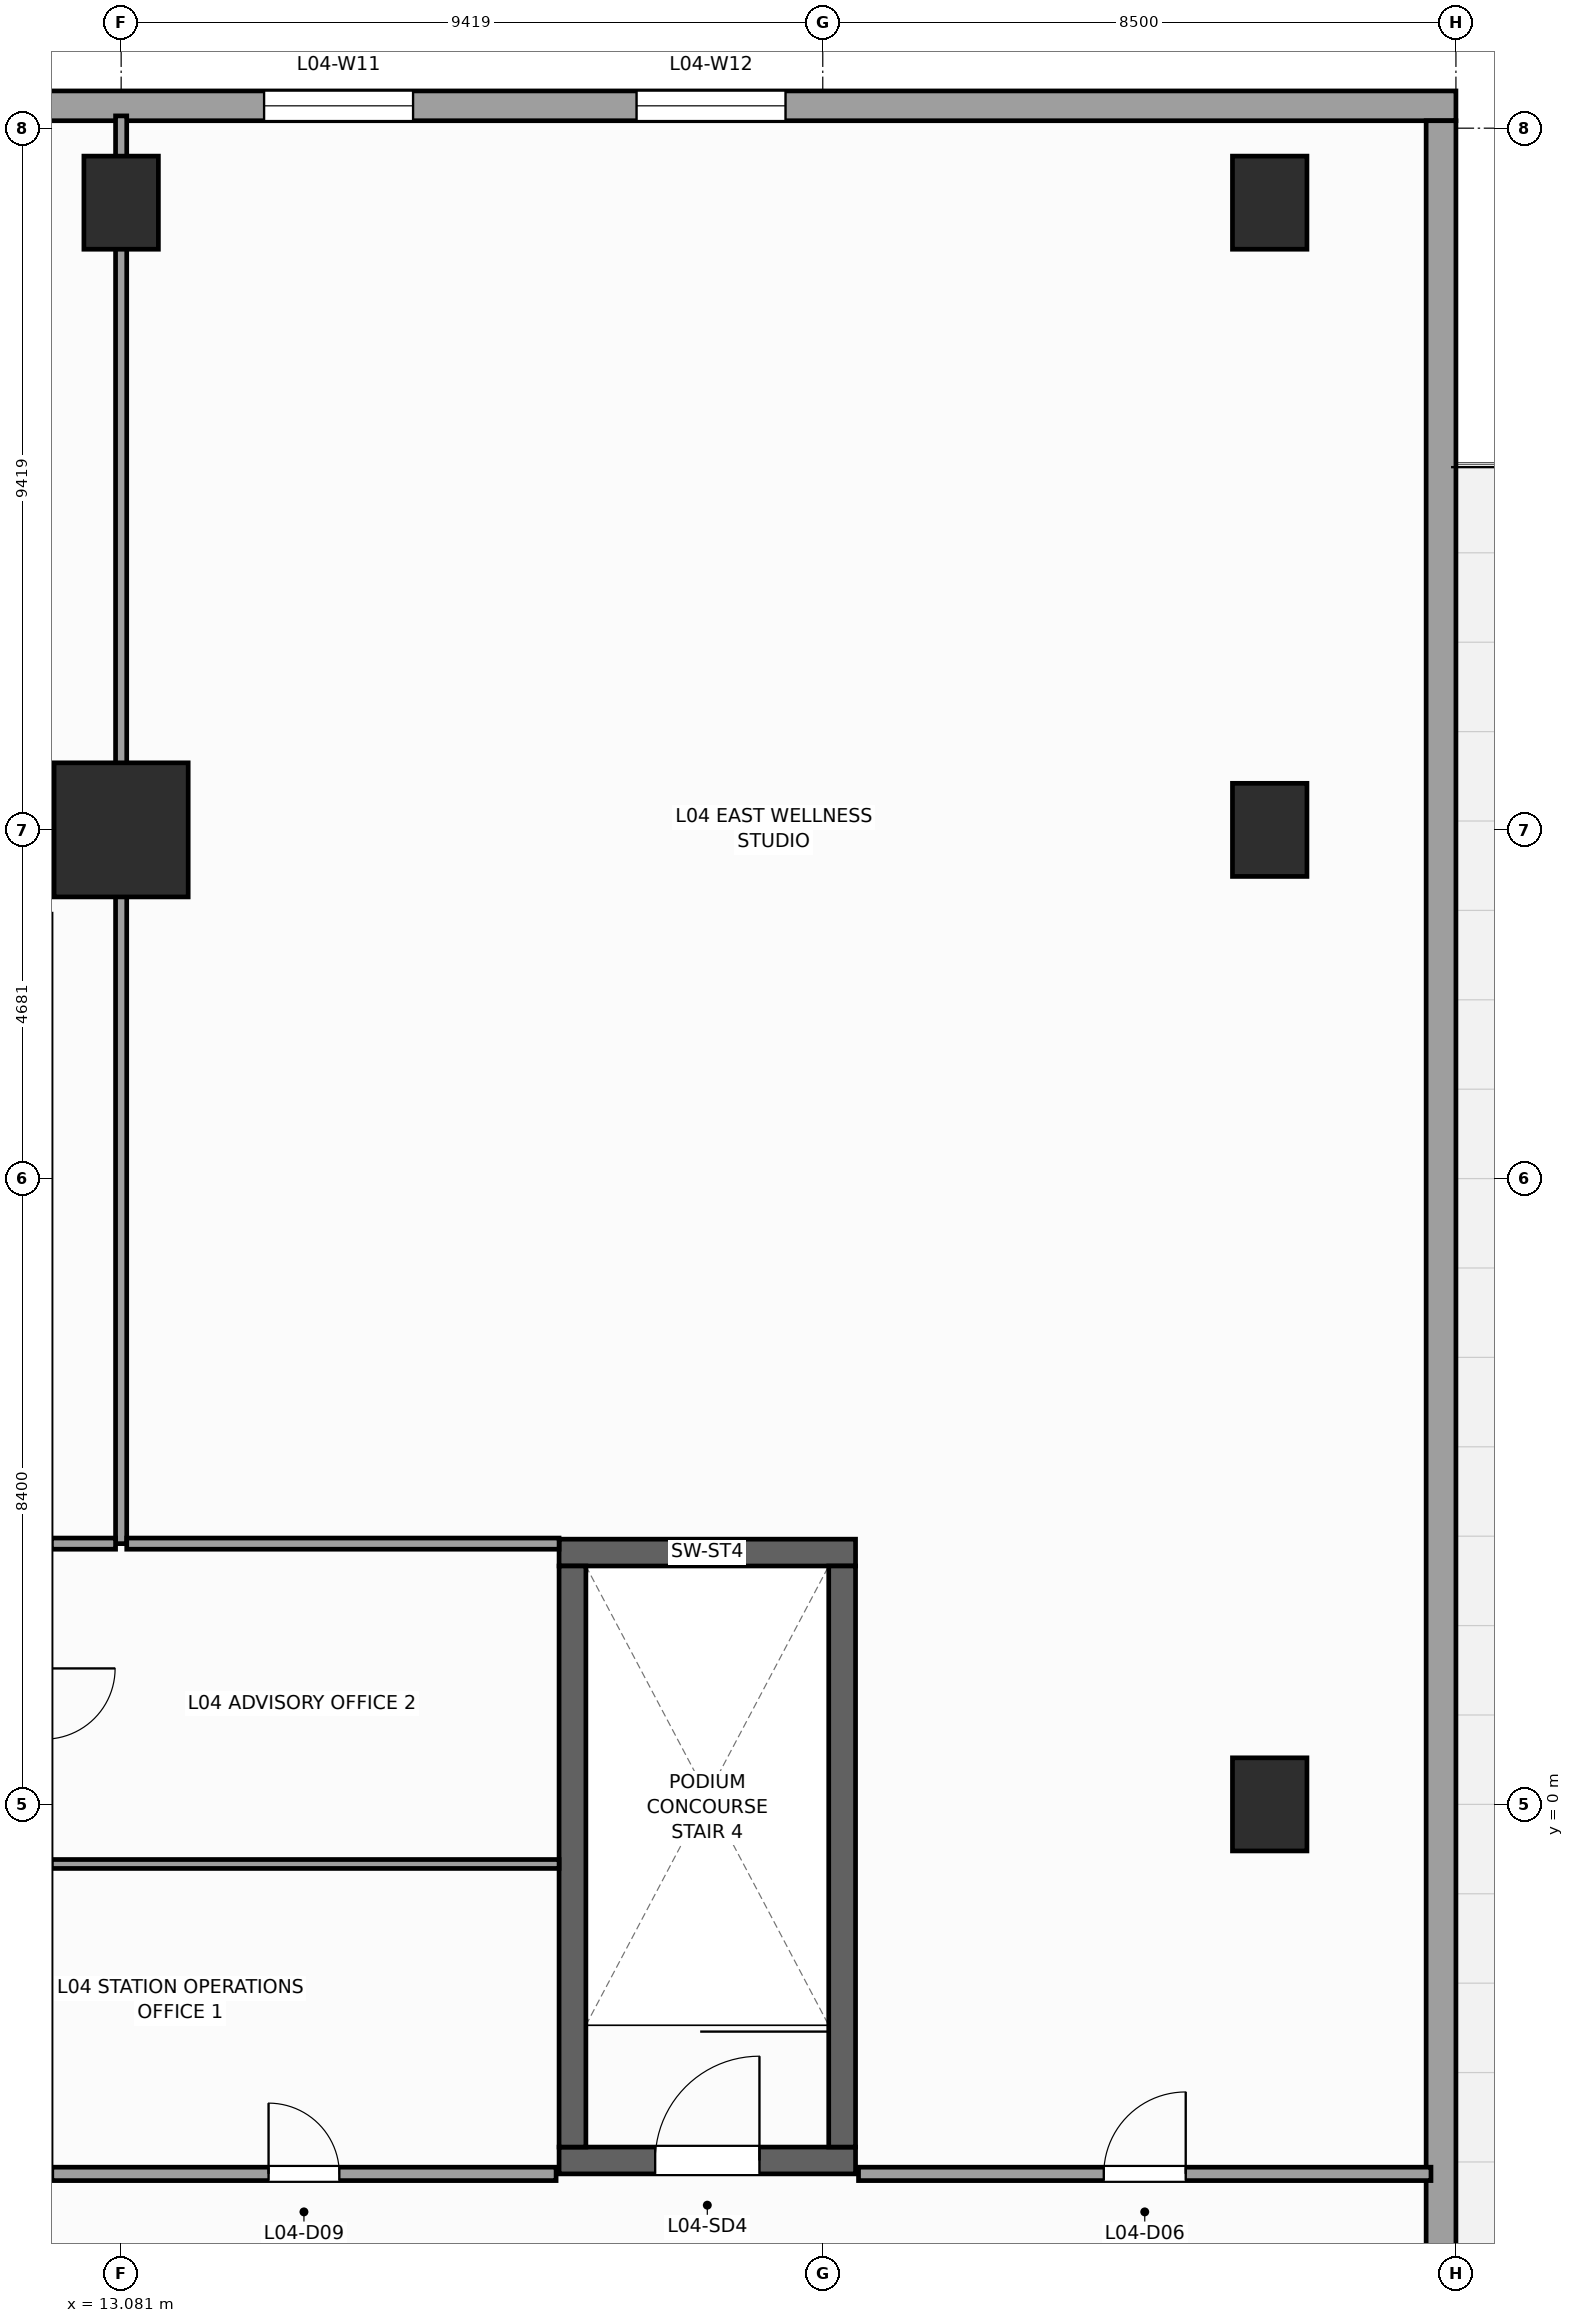
"""IFC4 building model, lengths in metres.
Left out: names, types, materials, properties, quantities, classifications, styles, units other than length and angle.
Written with IfcOpenShell. Run it as: python <this file> out.ifc"""

import sys

from ifc_helpers import new_model, si_unit, direction, frame, frame_2d, origin, origin_2d, place, context, subcontext, project, spatial, rectangle, extrude, source, transform, mapped, element, fill, save


model = new_model("IFC4")
c1 = context("Model", 3, precision=1e-05, world=origin(), true_north=direction((0.0, 1.0)))
c2 = subcontext(c1, "Body", "Model", "MODEL_VIEW")
j1 = project(units=[si_unit("LENGTHUNIT", "METRE"), si_unit("PLANEANGLEUNIT", "RADIAN")], contexts=[c1])
p1 = place(None, origin())
s1 = spatial("IfcSite", under=j1, at=p1, CompositionType="ELEMENT")
p2 = place(p1, origin())
s2 = spatial("IfcBuilding", under=s1, at=p2, CompositionType="ELEMENT")
p3 = place(p2, frame((0.0, 0.0, 21.0)))
s3 = spatial("IfcBuildingStorey", under=s2, at=p3, CompositionType="ELEMENT", Elevation=21.0)
p4 = place(p3, frame((18.96, -4.78, 0.0), z_axis=(0.0, 0.0, 1.0), x_axis=(1.0, 0.0, 0.0)))
e1 = element("IfcWall", 1, at=p4, inside=s3, PredefinedType="SHEAR", context=c2, shape_type="SweptSolid", body=[
    extrude(rectangle(XDim=3.98, YDim=0.36, at=frame_2d((1.99, 0.0))), origin(), (0.0, 0.0, 1.0), 5.0),
])
p5 = place(p4, frame((1.29, 0.0, 0.0)))
e2 = element("IfcOpeningElement", 2, at=p5, cuts=e1, PredefinedType="OPENING", context=c2, shape_type="SweptSolid", body=[
    extrude(rectangle(XDim=1.4, YDim=2.2, at=frame_2d((0.7, 1.1))), frame((0.0, 0.19, 0.0), z_axis=(0.0, -1.0, 0.0), x_axis=(1.0, 0.0, 0.0)), (0.0, 0.0, 1.0), 0.38),
])
p6 = place(p3, frame((18.96, 3.38, 0.0), z_axis=(0.0, 0.0, 1.0), x_axis=(1.0, 0.0, 0.0)))
e3 = element("IfcWall", 3, at=p6, inside=s3, PredefinedType="SHEAR", context=c2, shape_type="SweptSolid", body=[
    extrude(rectangle(XDim=3.98, YDim=0.36, at=frame_2d((1.99, 0.0))), origin(), (0.0, 0.0, 1.0), 5.0),
])
for number, where, z_axis, x_axis in (
    (4, (19.14, -4.6, 0.0), (0.0, 0.0, 1.0), (0.0, 1.0, 0.0)),
    (5, (22.76, -4.6, 0.0), (0.0, 0.0, 1.0), (0.0, 1.0, 0.0)),
):
    element("IfcWall", number, at=place(p3, frame(where, z_axis=z_axis, x_axis=x_axis)), inside=s3, PredefinedType="SHEAR", context=c2, shape_type="SweptSolid", body=[
        extrude(rectangle(XDim=7.8, YDim=0.36, at=frame_2d((3.9, 0.0))), origin(), (0.0, 0.0, 1.0), 5.0),
    ])
m1 = source(origin(), c2, "Body", "SweptSolid", [
    extrude(rectangle(XDim=1.8, YDim=1.8, at=origin_2d()), origin(), (0.0, 0.0, 1.0), 5.0),
])
p7 = place(p3, frame((13.081, 13.081, 0.0), z_axis=(0.0, 0.0, 1.0), x_axis=(1.0, 0.0, 0.0)))
e6 = element("IfcColumn", 6, at=p7, inside=s3, PredefinedType="COLUMN", context=c2, shape_type="MappedRepresentation", body=[
    mapped(m1, transform((0.0, 0.0, 0.0), scale=1.0)),
])
m2 = source(origin(), c2, "Body", "SweptSolid", [
    extrude(rectangle(XDim=1.0, YDim=1.25, at=origin_2d()), origin(), (0.0, 0.0, 1.0), 5.0),
])
for number, where, z_axis, x_axis in (
    (7, (13.081, 21.5, 0.0), (0.0, 0.0, 1.0), (1.0, 0.0, 0.0)),
    (8, (28.5, 21.5, 0.0), (0.0, 0.0, 1.0), (1.0, 0.0, 0.0)),
    (9, (28.5, 0.0, 0.0), (0.0, 0.0, 1.0), (1.0, 0.0, 0.0)),
    (10, (28.5, 13.081, 0.0), (0.0, 0.0, 1.0), (1.0, 0.0, 0.0)),
):
    element("IfcColumn", number, at=place(p3, frame(where, z_axis=z_axis, x_axis=x_axis)), inside=s3, PredefinedType="COLUMN", context=c2, shape_type="MappedRepresentation", body=[
        mapped(m2, transform((0.0, 0.0, 0.0), scale=1.0)),
    ])
p8 = place(p3, frame((1.5, 22.8, 0.0), z_axis=(0.0, 0.0, 1.0), x_axis=(1.0, 0.0, 0.0)))
e11 = element("IfcWall", 11, at=p8, inside=s3, PredefinedType="STANDARD", context=c2, shape_type="SweptSolid", body=[
    extrude(rectangle(XDim=29.5, YDim=0.4, at=frame_2d((14.75, 0.0))), origin(), (0.0, 0.0, 1.0), 4.72),
])
p9 = place(p8, frame((8.0, 0.0, 0.65)))
e12 = element("IfcOpeningElement", 12, at=p9, cuts=e11, PredefinedType="OPENING", context=c2, shape_type="SweptSolid", body=[
    extrude(rectangle(XDim=2.0, YDim=1.45, at=frame_2d((1.0, 0.725))), frame((0.0, 0.21, 0.0), z_axis=(0.0, -1.0, 0.0), x_axis=(1.0, 0.0, 0.0)), (0.0, 0.0, 1.0), 0.42),
])
p10 = place(p8, frame((13.5, 0.0, 0.65)))
e13 = element("IfcOpeningElement", 13, at=p10, cuts=e11, PredefinedType="OPENING", context=c2, shape_type="SweptSolid", body=[
    extrude(rectangle(XDim=2.0, YDim=1.45, at=frame_2d((1.0, 0.725))), frame((0.0, 0.21, 0.0), z_axis=(0.0, -1.0, 0.0), x_axis=(1.0, 0.0, 0.0)), (0.0, 0.0, 1.0), 0.42),
])
p11 = place(p8, frame((18.5, 0.0, 0.65)))
e14 = element("IfcOpeningElement", 14, at=p11, cuts=e11, PredefinedType="OPENING", context=c2, shape_type="SweptSolid", body=[
    extrude(rectangle(XDim=2.0, YDim=1.45, at=frame_2d((1.0, 0.725))), frame((0.0, 0.21, 0.0), z_axis=(0.0, -1.0, 0.0), x_axis=(1.0, 0.0, 0.0)), (0.0, 0.0, 1.0), 0.42),
])
p12 = place(p3, frame((30.8, -22.6, 0.0), z_axis=(0.0, 0.0, 1.0), x_axis=(0.0, 1.0, 0.0)))
e15 = element("IfcWall", 15, at=p12, inside=s3, PredefinedType="STANDARD", context=c2, shape_type="SweptSolid", body=[
    extrude(rectangle(XDim=45.2, YDim=0.4, at=frame_2d((22.6, 0.0))), origin(), (0.0, 0.0, 1.0), 4.72),
])
p13 = place(p12, frame((13.5, 0.0, 0.0)))
e16 = element("IfcOpeningElement", 16, at=p13, cuts=e15, PredefinedType="OPENING", context=c2, shape_type="SweptSolid", body=[
    extrude(rectangle(XDim=1.2, YDim=2.3, at=frame_2d((0.6, 1.15))), frame((0.0, 0.21, 0.0), z_axis=(0.0, -1.0, 0.0), x_axis=(1.0, 0.0, 0.0)), (0.0, 0.0, 1.0), 0.42),
])
p14 = place(p3, frame((12.15, -4.96, 0.0), z_axis=(0.0, 0.0, 1.0), x_axis=(1.0, 0.0, 0.0)))
e17 = element("IfcWall", 17, at=p14, inside=s3, PredefinedType="PARTITIONING", context=c2, shape_type="SweptSolid", body=[
    extrude(rectangle(XDim=6.77, YDim=0.18, at=frame_2d((3.385, 0.0))), origin(), (0.0, 0.0, 1.0), 4.72),
])
p15 = place(p14, frame((2.91, 0.0, 0.0)))
e18 = element("IfcOpeningElement", 18, at=p15, cuts=e17, PredefinedType="OPENING", context=c2, shape_type="SweptSolid", body=[
    extrude(rectangle(XDim=0.95, YDim=2.15, at=frame_2d((0.475, 1.075))), frame((0.0, 0.1, 0.0), z_axis=(0.0, -1.0, 0.0), x_axis=(1.0, 0.0, 0.0)), (0.0, 0.0, 1.0), 0.2),
])
p16 = place(p3, frame((22.98, -4.96, 0.0), z_axis=(0.0, 0.0, 1.0), x_axis=(1.0, 0.0, 0.0)))
e19 = element("IfcWall", 19, at=p16, inside=s3, PredefinedType="PARTITIONING", context=c2, shape_type="SweptSolid", body=[
    extrude(rectangle(XDim=7.685, YDim=0.18, at=frame_2d((3.843, 0.0))), origin(), (0.0, 0.0, 1.0), 4.72),
])
p17 = place(p16, frame((3.292, 0.0, 0.0)))
e20 = element("IfcOpeningElement", 20, at=p17, cuts=e19, PredefinedType="OPENING", context=c2, shape_type="SweptSolid", body=[
    extrude(rectangle(XDim=1.1, YDim=2.2, at=frame_2d((0.55, 1.1))), frame((0.0, 0.1, 0.0), z_axis=(0.0, -1.0, 0.0), x_axis=(1.0, 0.0, 0.0)), (0.0, 0.0, 1.0), 0.2),
])
p18 = place(p3, frame((13.081, 3.5, 0.0), z_axis=(0.0, 0.0, 1.0), x_axis=(0.0, 1.0, 0.0)))
e21 = element("IfcWall", 21, at=p18, inside=s3, PredefinedType="PARTITIONING", context=c2, shape_type="SweptSolid", body=[
    extrude(rectangle(XDim=19.165, YDim=0.15, at=frame_2d((9.583, 0.0))), origin(), (0.0, 0.0, 1.0), 2.88),
])
p19 = place(p3, frame((12.145, 3.5, 0.0), z_axis=(0.0, 0.0, 1.0), x_axis=(1.0, 0.0, 0.0)))
e22 = element("IfcWall", 22, at=p19, inside=s3, PredefinedType="PARTITIONING", context=c2, shape_type="SweptSolid", body=[
    extrude(rectangle(XDim=0.861, YDim=0.15, at=frame_2d((0.431, 0.0))), origin(), (0.0, 0.0, 1.0), 4.72),
])
p20 = place(p3, frame((13.156, 3.5, 0.0), z_axis=(0.0, 0.0, 1.0), x_axis=(1.0, 0.0, 0.0)))
e23 = element("IfcWall", 23, at=p20, inside=s3, PredefinedType="PARTITIONING", context=c2, shape_type="SweptSolid", body=[
    extrude(rectangle(XDim=5.804, YDim=0.15, at=frame_2d((2.902, 0.0))), origin(), (0.0, 0.0, 1.0), 4.72),
])
p21 = place(p3, frame((12.145, -0.8, 0.0), z_axis=(0.0, 0.0, 1.0), x_axis=(1.0, 0.0, 0.0)))
e24 = element("IfcWall", 24, at=p21, inside=s3, PredefinedType="PARTITIONING", context=c2, shape_type="SweptSolid", body=[
    extrude(rectangle(XDim=6.815, YDim=0.12, at=frame_2d((3.407, 0.0))), origin(), (0.0, 0.0, 1.0), 2.75),
])
m3 = source(origin(), c2, "Body", "SweptSolid", [
    extrude(rectangle(XDim=2.0, YDim=1.45, at=frame_2d((1.0, 0.725))), frame((0.0, 0.03, 0.0), z_axis=(0.0, -1.0, 0.0), x_axis=(1.0, 0.0, 0.0)), (0.0, 0.0, 1.0), 0.06),
])
p22 = place(p10, origin())
e25 = element("IfcWindow", 25, at=p22, inside=s3, PartitioningType="SINGLE_PANEL", PredefinedType="WINDOW", context=c2, shape_type="MappedRepresentation", body=[
    mapped(m3, transform((0.0, 0.0, 0.0), scale=1.0)),
])
fill(e13, e25)
p23 = place(p11, origin())
e26 = element("IfcWindow", 26, at=p23, inside=s3, PartitioningType="SINGLE_PANEL", PredefinedType="WINDOW", context=c2, shape_type="MappedRepresentation", body=[
    mapped(m3, transform((0.0, 0.0, 0.0), scale=1.0)),
])
fill(e14, e26)
m4 = source(origin(), c2, "Body", "SweptSolid", [
    extrude(rectangle(XDim=1.4, YDim=2.2, at=frame_2d((0.7, 1.1))), frame((0.0, 0.025, 0.0), z_axis=(0.0, -1.0, 0.0), x_axis=(1.0, 0.0, 0.0)), (0.0, 0.0, 1.0), 0.05),
])
p24 = place(p5, origin())
e27 = element("IfcDoor", 27, at=p24, inside=s3, OperationType="SINGLE_SWING_RIGHT", PredefinedType="DOOR", context=c2, shape_type="MappedRepresentation", body=[
    mapped(m4, transform((0.0, 0.0, 0.0), scale=1.0)),
])
fill(e2, e27)
m5 = source(origin(), c2, "Body", "SweptSolid", [
    extrude(rectangle(XDim=1.1, YDim=2.2, at=frame_2d((0.55, 1.1))), frame((0.0, 0.025, 0.0), z_axis=(0.0, -1.0, 0.0), x_axis=(1.0, 0.0, 0.0)), (0.0, 0.0, 1.0), 0.05),
])
p25 = place(p17, origin())
e28 = element("IfcDoor", 28, at=p25, inside=s3, OperationType="SINGLE_SWING_RIGHT", PredefinedType="DOOR", context=c2, shape_type="MappedRepresentation", body=[
    mapped(m5, transform((0.0, 0.0, 0.0), scale=1.0)),
])
fill(e20, e28)
m6 = source(origin(), c2, "Body", "SweptSolid", [
    extrude(rectangle(XDim=0.95, YDim=2.15, at=frame_2d((0.475, 1.075))), frame((0.0, 0.025, 0.0), z_axis=(0.0, -1.0, 0.0), x_axis=(1.0, 0.0, 0.0)), (0.0, 0.0, 1.0), 0.05),
])
p26 = place(p15, origin())
e29 = element("IfcDoor", 29, at=p26, inside=s3, OperationType="SINGLE_SWING_LEFT", PredefinedType="DOOR", context=c2, shape_type="MappedRepresentation", body=[
    mapped(m6, transform((0.0, 0.0, 0.0), scale=1.0)),
])
fill(e18, e29)
save(model, sys.argv[1])
